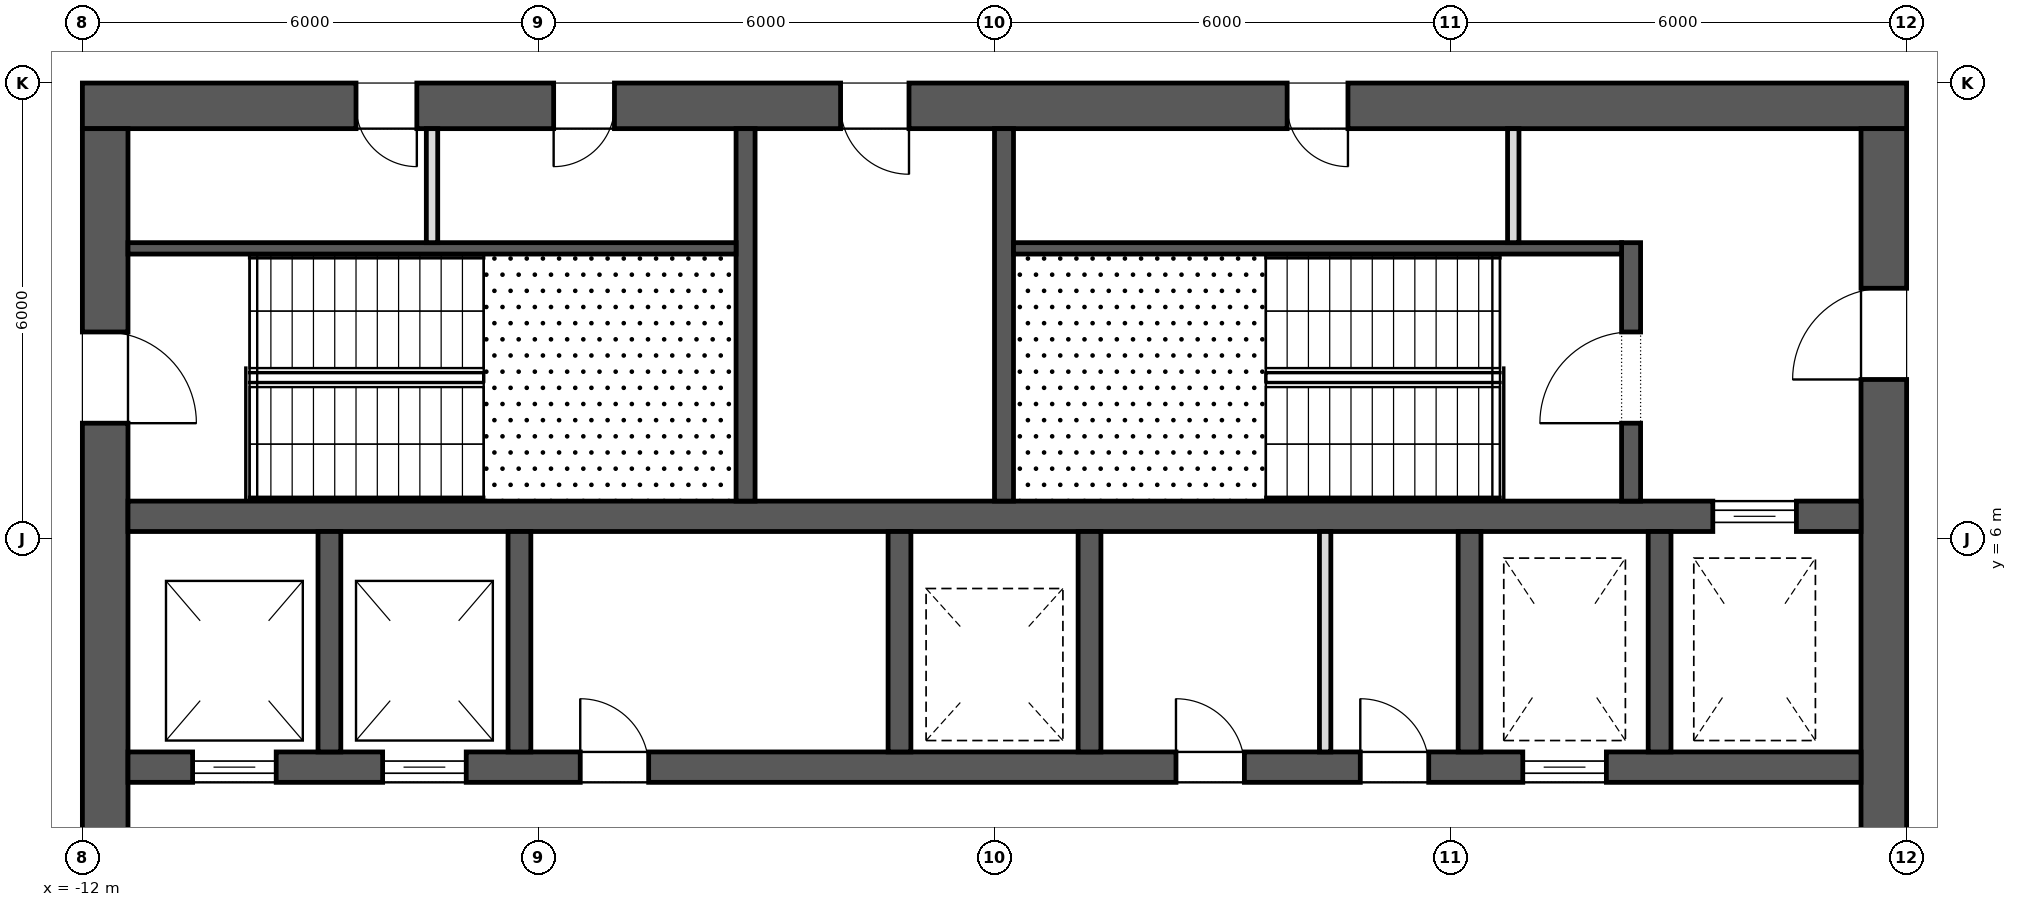
"""IFC4 building model, lengths in metres.
Left out: names, types, materials, properties, quantities, classifications, styles, units other than length and angle.
Written with IfcOpenShell. Run it as: python <this file> out.ifc"""

import sys

from ifc_helpers import new_model, si_unit, direction, frame, frame_2d, origin, place, context, subcontext, project, spatial, rectangle, extrude, element, fill, save


model = new_model("IFC4")
c1 = context("Model", 3, precision=1e-05, world=origin(), true_north=direction((0.0, 1.0)))
c2 = subcontext(c1, "Body", "Model", "MODEL_VIEW")
j1 = project(units=[si_unit("LENGTHUNIT", "METRE"), si_unit("PLANEANGLEUNIT", "RADIAN")], contexts=[c1])
p1 = place(None, origin())
s1 = spatial("IfcSite", under=j1, at=p1, CompositionType="ELEMENT")
p2 = place(p1, origin())
s2 = spatial("IfcBuilding", under=s1, at=p2, CompositionType="ELEMENT")
p3 = place(p2, frame((0.0, 0.0, 316.3)))
s3 = spatial("IfcBuildingStorey", under=s2, at=p3, CompositionType="ELEMENT", Elevation=316.3)
p4 = place(p3, frame((-12.0, 11.7, 0.0), z_axis=(0.0, 0.0, 1.0), x_axis=(1.0, 0.0, 0.0)))
e1 = element("IfcWall", 1, at=p4, inside=s3, PredefinedType="SHEAR", context=c2, shape_type="SweptSolid", body=[
    extrude(rectangle(XDim=24.0, YDim=0.6, at=frame_2d((12.0, 0.0))), origin(), (0.0, 0.0, 1.0), 4.0),
])
p5 = place(p4, frame((9.975, 0.0, 0.0)))
e2 = element("IfcOpeningElement", 2, at=p5, cuts=e1, PredefinedType="OPENING", context=c2, shape_type="SweptSolid", body=[
    extrude(rectangle(XDim=0.9, YDim=2.1, at=frame_2d((0.45, 1.05))), frame((0.0, 0.312, 0.0), z_axis=(0.0, -1.0, 0.0), x_axis=(1.0, 0.0, 0.0)), (0.0, 0.0, 1.0), 0.624),
])
p6 = place(p4, frame((3.6, 0.0, 0.0)))
e3 = element("IfcOpeningElement", 3, at=p6, cuts=e1, PredefinedType="OPENING", context=c2, shape_type="SweptSolid", body=[
    extrude(rectangle(XDim=0.8, YDim=2.1, at=frame_2d((0.4, 1.05))), frame((0.0, 0.312, 0.0), z_axis=(0.0, -1.0, 0.0), x_axis=(1.0, 0.0, 0.0)), (0.0, 0.0, 1.0), 0.624),
])
p7 = place(p4, frame((6.2, 0.0, 0.0)))
e4 = element("IfcOpeningElement", 4, at=p7, cuts=e1, PredefinedType="OPENING", context=c2, shape_type="SweptSolid", body=[
    extrude(rectangle(XDim=0.8, YDim=2.1, at=frame_2d((0.4, 1.05))), frame((0.0, 0.312, 0.0), z_axis=(0.0, -1.0, 0.0), x_axis=(1.0, 0.0, 0.0)), (0.0, 0.0, 1.0), 0.624),
])
p8 = place(p4, frame((15.85, 0.0, 0.0)))
e5 = element("IfcOpeningElement", 5, at=p8, cuts=e1, PredefinedType="OPENING", context=c2, shape_type="SweptSolid", body=[
    extrude(rectangle(XDim=0.8, YDim=2.1, at=frame_2d((0.4, 1.05))), frame((0.0, 0.312, 0.0), z_axis=(0.0, -1.0, 0.0), x_axis=(1.0, 0.0, 0.0)), (0.0, 0.0, 1.0), 0.624),
])
p9 = place(p3, frame((11.7, -11.4, 0.0), z_axis=(0.0, 0.0, 1.0), x_axis=(0.0, 1.0, 0.0)))
e6 = element("IfcWall", 6, at=p9, inside=s3, PredefinedType="SHEAR", context=c2, shape_type="SweptSolid", body=[
    extrude(rectangle(XDim=22.8, YDim=0.6, at=frame_2d((11.4, 0.0))), origin(), (0.0, 0.0, 1.0), 4.0),
])
p10 = place(p9, frame((10.2, 0.0, 0.0)))
e7 = element("IfcOpeningElement", 7, at=p10, cuts=e6, PredefinedType="OPENING", context=c2, shape_type="SweptSolid", body=[
    extrude(rectangle(XDim=2.4, YDim=2.1, at=frame_2d((1.2, 1.05))), frame((0.0, 0.312, 0.0), z_axis=(0.0, -1.0, 0.0), x_axis=(1.0, 0.0, 0.0)), (0.0, 0.0, 1.0), 0.624),
])
p11 = place(p9, frame((19.5, 0.0, 0.0)))
e8 = element("IfcOpeningElement", 8, at=p11, cuts=e6, PredefinedType="OPENING", context=c2, shape_type="SweptSolid", body=[
    extrude(rectangle(XDim=1.2, YDim=2.1, at=frame_2d((0.6, 1.05))), frame((0.0, 0.312, 0.0), z_axis=(0.0, -1.0, 0.0), x_axis=(1.0, 0.0, 0.0)), (0.0, 0.0, 1.0), 0.624),
])
p12 = place(p9, frame((2.1, 0.0, 0.0)))
e9 = element("IfcOpeningElement", 9, at=p12, cuts=e6, PredefinedType="OPENING", context=c2, shape_type="SweptSolid", body=[
    extrude(rectangle(XDim=1.2, YDim=2.1, at=frame_2d((0.6, 1.05))), frame((0.0, 0.312, 0.0), z_axis=(0.0, -1.0, 0.0), x_axis=(1.0, 0.0, 0.0)), (0.0, 0.0, 1.0), 0.624),
])
p13 = place(p3, frame((-11.7, -11.4, 0.0), z_axis=(0.0, 0.0, 1.0), x_axis=(0.0, 1.0, 0.0)))
e10 = element("IfcWall", 10, at=p13, inside=s3, PredefinedType="SHEAR", context=c2, shape_type="SweptSolid", body=[
    extrude(rectangle(XDim=22.8, YDim=0.6, at=frame_2d((11.4, 0.0))), origin(), (0.0, 0.0, 1.0), 4.0),
])
p14 = place(p13, frame((10.2, 0.0, 0.0)))
e11 = element("IfcOpeningElement", 11, at=p14, cuts=e10, PredefinedType="OPENING", context=c2, shape_type="SweptSolid", body=[
    extrude(rectangle(XDim=2.4, YDim=2.1, at=frame_2d((1.2, 1.05))), frame((0.0, 0.312, 0.0), z_axis=(0.0, -1.0, 0.0), x_axis=(1.0, 0.0, 0.0)), (0.0, 0.0, 1.0), 0.624),
])
p15 = place(p13, frame((18.925, 0.0, 0.0)))
e12 = element("IfcOpeningElement", 12, at=p15, cuts=e10, PredefinedType="OPENING", context=c2, shape_type="SweptSolid", body=[
    extrude(rectangle(XDim=1.2, YDim=2.1, at=frame_2d((0.6, 1.05))), frame((0.0, 0.312, 0.0), z_axis=(0.0, -1.0, 0.0), x_axis=(1.0, 0.0, 0.0)), (0.0, 0.0, 1.0), 0.624),
])
p16 = place(p13, frame((2.675, 0.0, 0.0)))
e13 = element("IfcOpeningElement", 13, at=p16, cuts=e10, PredefinedType="OPENING", context=c2, shape_type="SweptSolid", body=[
    extrude(rectangle(XDim=1.2, YDim=2.1, at=frame_2d((0.6, 1.05))), frame((0.0, 0.312, 0.0), z_axis=(0.0, -1.0, 0.0), x_axis=(1.0, 0.0, 0.0)), (0.0, 0.0, 1.0), 0.624),
])
p17 = place(p3, frame((-11.4, 3.0, 0.0), z_axis=(0.0, 0.0, 1.0), x_axis=(1.0, 0.0, 0.0)))
e14 = element("IfcWall", 14, at=p17, inside=s3, PredefinedType="SHEAR", context=c2, shape_type="SweptSolid", body=[
    extrude(rectangle(XDim=22.8, YDim=0.4, at=frame_2d((11.4, 0.0))), origin(), (0.0, 0.0, 1.0), 4.0),
])
p18 = place(p17, frame((0.85, 0.0, 0.0)))
e15 = element("IfcOpeningElement", 15, at=p18, cuts=e14, PredefinedType="OPENING", context=c2, shape_type="SweptSolid", body=[
    extrude(rectangle(XDim=1.1, YDim=2.1, at=frame_2d((0.55, 1.05))), frame((0.0, 0.212, 0.0), z_axis=(0.0, -1.0, 0.0), x_axis=(1.0, 0.0, 0.0)), (0.0, 0.0, 1.0), 0.424),
])
p19 = place(p17, frame((3.35, 0.0, 0.0)))
e16 = element("IfcOpeningElement", 16, at=p19, cuts=e14, PredefinedType="OPENING", context=c2, shape_type="SweptSolid", body=[
    extrude(rectangle(XDim=1.1, YDim=2.1, at=frame_2d((0.55, 1.05))), frame((0.0, 0.212, 0.0), z_axis=(0.0, -1.0, 0.0), x_axis=(1.0, 0.0, 0.0)), (0.0, 0.0, 1.0), 0.424),
])
p20 = place(p17, frame((18.35, 0.0, 0.0)))
e17 = element("IfcOpeningElement", 17, at=p20, cuts=e14, PredefinedType="OPENING", context=c2, shape_type="SweptSolid", body=[
    extrude(rectangle(XDim=1.1, YDim=2.1, at=frame_2d((0.55, 1.05))), frame((0.0, 0.212, 0.0), z_axis=(0.0, -1.0, 0.0), x_axis=(1.0, 0.0, 0.0)), (0.0, 0.0, 1.0), 0.424),
])
p21 = place(p17, frame((13.788, 0.0, 0.0)))
e18 = element("IfcOpeningElement", 18, at=p21, cuts=e14, PredefinedType="OPENING", context=c2, shape_type="SweptSolid", body=[
    extrude(rectangle(XDim=0.9, YDim=2.1, at=frame_2d((0.45, 1.05))), frame((0.0, 0.212, 0.0), z_axis=(0.0, -1.0, 0.0), x_axis=(1.0, 0.0, 0.0)), (0.0, 0.0, 1.0), 0.424),
])
p22 = place(p17, frame((16.212, 0.0, 0.0)))
e19 = element("IfcOpeningElement", 19, at=p22, cuts=e14, PredefinedType="OPENING", context=c2, shape_type="SweptSolid", body=[
    extrude(rectangle(XDim=0.9, YDim=2.1, at=frame_2d((0.45, 1.05))), frame((0.0, 0.212, 0.0), z_axis=(0.0, -1.0, 0.0), x_axis=(1.0, 0.0, 0.0)), (0.0, 0.0, 1.0), 0.424),
])
p23 = place(p17, frame((5.95, 0.0, 0.0)))
e20 = element("IfcOpeningElement", 20, at=p23, cuts=e14, PredefinedType="OPENING", context=c2, shape_type="SweptSolid", body=[
    extrude(rectangle(XDim=0.9, YDim=2.1, at=frame_2d((0.45, 1.05))), frame((0.0, 0.212, 0.0), z_axis=(0.0, -1.0, 0.0), x_axis=(1.0, 0.0, 0.0)), (0.0, 0.0, 1.0), 0.424),
])
p24 = place(p3, frame((-11.4, 6.3, 0.0), z_axis=(0.0, 0.0, 1.0), x_axis=(1.0, 0.0, 0.0)))
e21 = element("IfcWall", 21, at=p24, inside=s3, PredefinedType="SHEAR", context=c2, shape_type="SweptSolid", body=[
    extrude(rectangle(XDim=22.8, YDim=0.4, at=frame_2d((11.4, 0.0))), origin(), (0.0, 0.0, 1.0), 4.0),
])
p25 = place(p24, frame((20.85, 0.0, 0.0)))
e22 = element("IfcOpeningElement", 22, at=p25, cuts=e21, PredefinedType="OPENING", context=c2, shape_type="SweptSolid", body=[
    extrude(rectangle(XDim=1.1, YDim=2.1, at=frame_2d((0.55, 1.05))), frame((0.0, 0.212, 0.0), z_axis=(0.0, -1.0, 0.0), x_axis=(1.0, 0.0, 0.0)), (0.0, 0.0, 1.0), 0.424),
])
for number, where, z_axis, x_axis in (
    (23, (-8.75, 3.2, 0.0), (0.0, 0.0, 1.0), (0.0, 1.0, 0.0)),
    (24, (-6.25, 3.2, 0.0), (0.0, 0.0, 1.0), (0.0, 1.0, 0.0)),
    (25, (-1.25, 3.2, 0.0), (0.0, 0.0, 1.0), (0.0, 1.0, 0.0)),
    (26, (1.25, 3.2, 0.0), (0.0, 0.0, 1.0), (0.0, 1.0, 0.0)),
    (27, (6.25, 3.2, 0.0), (0.0, 0.0, 1.0), (0.0, 1.0, 0.0)),
    (28, (8.75, 3.2, 0.0), (0.0, 0.0, 1.0), (0.0, 1.0, 0.0)),
):
    element("IfcWall", number, at=place(p3, frame(where, z_axis=z_axis, x_axis=x_axis)), inside=s3, PredefinedType="SHEAR", context=c2, shape_type="SweptSolid", body=[
        extrude(rectangle(XDim=2.9, YDim=0.3, at=frame_2d((1.45, 0.0))), origin(), (0.0, 0.0, 1.0), 4.0),
    ])
for number, where, z_axis, x_axis in (
    (29, (-3.275, 6.5, 0.0), (0.0, 0.0, 1.0), (0.0, 1.0, 0.0)),
    (30, (0.125, 6.5, 0.0), (0.0, 0.0, 1.0), (0.0, 1.0, 0.0)),
):
    element("IfcWall", number, at=place(p3, frame(where, z_axis=z_axis, x_axis=x_axis)), inside=s3, PredefinedType="SHEAR", context=c2, shape_type="SweptSolid", body=[
        extrude(rectangle(XDim=4.9, YDim=0.25, at=frame_2d((2.45, 0.0))), origin(), (0.0, 0.0, 1.0), 3.7),
    ])
p26 = place(p3, frame((8.375, 6.5, 0.0), z_axis=(0.0, 0.0, 1.0), x_axis=(0.0, 1.0, 0.0)))
e31 = element("IfcWall", 31, at=p26, inside=s3, PredefinedType="SHEAR", context=c2, shape_type="SweptSolid", body=[
    extrude(rectangle(XDim=3.4, YDim=0.25, at=frame_2d((1.7, 0.0))), origin(), (0.0, 0.0, 1.0), 3.7),
])
p27 = place(p26, frame((1.025, 0.0, 0.0)))
e32 = element("IfcOpeningElement", 32, at=p27, cuts=e31, PredefinedType="OPENING", context=c2, shape_type="SweptSolid", body=[
    extrude(rectangle(XDim=1.2, YDim=2.1, at=frame_2d((0.6, 1.05))), frame((0.0, 0.137, 0.0), z_axis=(0.0, -1.0, 0.0), x_axis=(1.0, 0.0, 0.0)), (0.0, 0.0, 1.0), 0.274),
])
for number, where, z_axis, x_axis in (
    (33, (-11.4, 9.825, 0.0), (0.0, 0.0, 1.0), (1.0, 0.0, 0.0)),
    (34, (0.25, 9.825, 0.0), (0.0, 0.0, 1.0), (1.0, 0.0, 0.0)),
):
    element("IfcWall", number, at=place(p3, frame(where, z_axis=z_axis, x_axis=x_axis)), inside=s3, PredefinedType="SHEAR", context=c2, shape_type="SweptSolid", body=[
        extrude(rectangle(XDim=8.0, YDim=0.15, at=frame_2d((4.0, 0.0))), origin(), (0.0, 0.0, 1.0), 3.7),
    ])
for number, where, z_axis, x_axis in (
    (35, (-7.4, 9.9, 0.0), (0.0, 0.0, 1.0), (0.0, 1.0, 0.0)),
    (36, (6.825, 9.9, 0.0), (0.0, 0.0, 1.0), (0.0, 1.0, 0.0)),
):
    element("IfcWall", number, at=place(p3, frame(where, z_axis=z_axis, x_axis=x_axis)), inside=s3, PredefinedType="PARTITIONING", context=c2, shape_type="SweptSolid", body=[
        extrude(rectangle(XDim=1.5, YDim=0.15, at=frame_2d((0.75, 0.0))), origin(), (0.0, 0.0, 1.0), 3.7),
    ])
p28 = place(p3, frame((4.35, 3.2, 0.0), z_axis=(0.0, 0.0, 1.0), x_axis=(0.0, 1.0, 0.0)))
e37 = element("IfcWall", 37, at=p28, inside=s3, PredefinedType="PARTITIONING", context=c2, shape_type="SweptSolid", body=[
    extrude(rectangle(XDim=2.9, YDim=0.15, at=frame_2d((1.45, 0.0))), origin(), (0.0, 0.0, 1.0), 3.7),
])
p29 = place(p25, origin())
e38 = element("IfcDoor", 38, at=p29, inside=s3, OperationType="SLIDING_TO_LEFT", PredefinedType="DOOR", context=c2, shape_type="SweptSolid", body=[
    extrude(rectangle(XDim=1.1, YDim=2.1, at=frame_2d((0.55, 1.05))), frame((0.0, 0.025, 0.0), z_axis=(0.0, -1.0, 0.0), x_axis=(1.0, 0.0, 0.0)), (0.0, 0.0, 1.0), 0.05),
])
fill(e22, e38)
p30 = place(p18, origin())
e39 = element("IfcDoor", 39, at=p30, inside=s3, OperationType="SLIDING_TO_LEFT", PredefinedType="DOOR", context=c2, shape_type="SweptSolid", body=[
    extrude(rectangle(XDim=1.1, YDim=2.1, at=frame_2d((0.55, 1.05))), frame((0.0, 0.025, 0.0), z_axis=(0.0, -1.0, 0.0), x_axis=(1.0, 0.0, 0.0)), (0.0, 0.0, 1.0), 0.05),
])
fill(e15, e39)
p31 = place(p19, origin())
e40 = element("IfcDoor", 40, at=p31, inside=s3, OperationType="SLIDING_TO_LEFT", PredefinedType="DOOR", context=c2, shape_type="SweptSolid", body=[
    extrude(rectangle(XDim=1.1, YDim=2.1, at=frame_2d((0.55, 1.05))), frame((0.0, 0.025, 0.0), z_axis=(0.0, -1.0, 0.0), x_axis=(1.0, 0.0, 0.0)), (0.0, 0.0, 1.0), 0.05),
])
fill(e16, e40)
p32 = place(p20, origin())
e41 = element("IfcDoor", 41, at=p32, inside=s3, OperationType="SLIDING_TO_LEFT", PredefinedType="DOOR", context=c2, shape_type="SweptSolid", body=[
    extrude(rectangle(XDim=1.1, YDim=2.1, at=frame_2d((0.55, 1.05))), frame((0.0, 0.025, 0.0), z_axis=(0.0, -1.0, 0.0), x_axis=(1.0, 0.0, 0.0)), (0.0, 0.0, 1.0), 0.05),
])
fill(e17, e41)
p33 = place(p15, frame((1.2, 0.0, 0.0), z_axis=(0.0, 0.0, 1.0), x_axis=(-1.0, 0.0, 0.0)))
e42 = element("IfcDoor", 42, at=p33, inside=s3, OperationType="SINGLE_SWING_LEFT", PredefinedType="DOOR", context=c2, shape_type="SweptSolid", body=[
    extrude(rectangle(XDim=1.2, YDim=2.1, at=frame_2d((0.6, 1.05))), frame((0.0, 0.025, 0.0), z_axis=(0.0, -1.0, 0.0), x_axis=(1.0, 0.0, 0.0)), (0.0, 0.0, 1.0), 0.05),
])
fill(e12, e42)
p34 = place(p27, origin())
e43 = element("IfcDoor", 43, at=p34, inside=s3, OperationType="SINGLE_SWING_RIGHT", PredefinedType="DOOR", context=c2, shape_type="SweptSolid", body=[
    extrude(rectangle(XDim=1.2, YDim=2.1, at=frame_2d((0.6, 1.05))), frame((0.0, 0.025, 0.0), z_axis=(0.0, -1.0, 0.0), x_axis=(1.0, 0.0, 0.0)), (0.0, 0.0, 1.0), 0.05),
])
fill(e32, e43)
p35 = place(p11, origin())
e44 = element("IfcDoor", 44, at=p35, inside=s3, OperationType="SINGLE_SWING_RIGHT", PredefinedType="DOOR", context=c2, shape_type="SweptSolid", body=[
    extrude(rectangle(XDim=1.2, YDim=2.1, at=frame_2d((0.6, 1.05))), frame((0.0, 0.025, 0.0), z_axis=(0.0, -1.0, 0.0), x_axis=(1.0, 0.0, 0.0)), (0.0, 0.0, 1.0), 0.05),
])
fill(e8, e44)
p36 = place(p5, frame((0.9, 0.0, 0.0), z_axis=(0.0, 0.0, 1.0), x_axis=(-1.0, 0.0, 0.0)))
e45 = element("IfcDoor", 45, at=p36, inside=s3, OperationType="SINGLE_SWING_RIGHT", PredefinedType="DOOR", context=c2, shape_type="SweptSolid", body=[
    extrude(rectangle(XDim=0.9, YDim=2.1, at=frame_2d((0.45, 1.05))), frame((0.0, 0.025, 0.0), z_axis=(0.0, -1.0, 0.0), x_axis=(1.0, 0.0, 0.0)), (0.0, 0.0, 1.0), 0.05),
])
fill(e2, e45)
p37 = place(p6, frame((0.8, 0.0, 0.0), z_axis=(0.0, 0.0, 1.0), x_axis=(-1.0, 0.0, 0.0)))
e46 = element("IfcDoor", 46, at=p37, inside=s3, OperationType="SINGLE_SWING_RIGHT", PredefinedType="DOOR", context=c2, shape_type="SweptSolid", body=[
    extrude(rectangle(XDim=0.8, YDim=2.1, at=frame_2d((0.4, 1.05))), frame((0.0, 0.025, 0.0), z_axis=(0.0, -1.0, 0.0), x_axis=(1.0, 0.0, 0.0)), (0.0, 0.0, 1.0), 0.05),
])
fill(e3, e46)
p38 = place(p7, frame((0.8, 0.0, 0.0), z_axis=(0.0, 0.0, 1.0), x_axis=(-1.0, 0.0, 0.0)))
e47 = element("IfcDoor", 47, at=p38, inside=s3, OperationType="SINGLE_SWING_LEFT", PredefinedType="DOOR", context=c2, shape_type="SweptSolid", body=[
    extrude(rectangle(XDim=0.8, YDim=2.1, at=frame_2d((0.4, 1.05))), frame((0.0, 0.025, 0.0), z_axis=(0.0, -1.0, 0.0), x_axis=(1.0, 0.0, 0.0)), (0.0, 0.0, 1.0), 0.05),
])
fill(e4, e47)
p39 = place(p8, frame((0.8, 0.0, 0.0), z_axis=(0.0, 0.0, 1.0), x_axis=(-1.0, 0.0, 0.0)))
e48 = element("IfcDoor", 48, at=p39, inside=s3, OperationType="SINGLE_SWING_RIGHT", PredefinedType="DOOR", context=c2, shape_type="SweptSolid", body=[
    extrude(rectangle(XDim=0.8, YDim=2.1, at=frame_2d((0.4, 1.05))), frame((0.0, 0.025, 0.0), z_axis=(0.0, -1.0, 0.0), x_axis=(1.0, 0.0, 0.0)), (0.0, 0.0, 1.0), 0.05),
])
fill(e5, e48)
p40 = place(p21, origin())
e49 = element("IfcDoor", 49, at=p40, inside=s3, OperationType="SINGLE_SWING_RIGHT", PredefinedType="DOOR", context=c2, shape_type="SweptSolid", body=[
    extrude(rectangle(XDim=0.9, YDim=2.1, at=frame_2d((0.45, 1.05))), frame((0.0, 0.025, 0.0), z_axis=(0.0, -1.0, 0.0), x_axis=(1.0, 0.0, 0.0)), (0.0, 0.0, 1.0), 0.05),
])
fill(e18, e49)
p41 = place(p22, origin())
e50 = element("IfcDoor", 50, at=p41, inside=s3, OperationType="SINGLE_SWING_RIGHT", PredefinedType="DOOR", context=c2, shape_type="SweptSolid", body=[
    extrude(rectangle(XDim=0.9, YDim=2.1, at=frame_2d((0.45, 1.05))), frame((0.0, 0.025, 0.0), z_axis=(0.0, -1.0, 0.0), x_axis=(1.0, 0.0, 0.0)), (0.0, 0.0, 1.0), 0.05),
])
fill(e19, e50)
p42 = place(p23, origin())
e51 = element("IfcDoor", 51, at=p42, inside=s3, OperationType="SINGLE_SWING_RIGHT", PredefinedType="DOOR", context=c2, shape_type="SweptSolid", body=[
    extrude(rectangle(XDim=0.9, YDim=2.1, at=frame_2d((0.45, 1.05))), frame((0.0, 0.025, 0.0), z_axis=(0.0, -1.0, 0.0), x_axis=(1.0, 0.0, 0.0)), (0.0, 0.0, 1.0), 0.05),
])
fill(e20, e51)
save(model, sys.argv[1])
